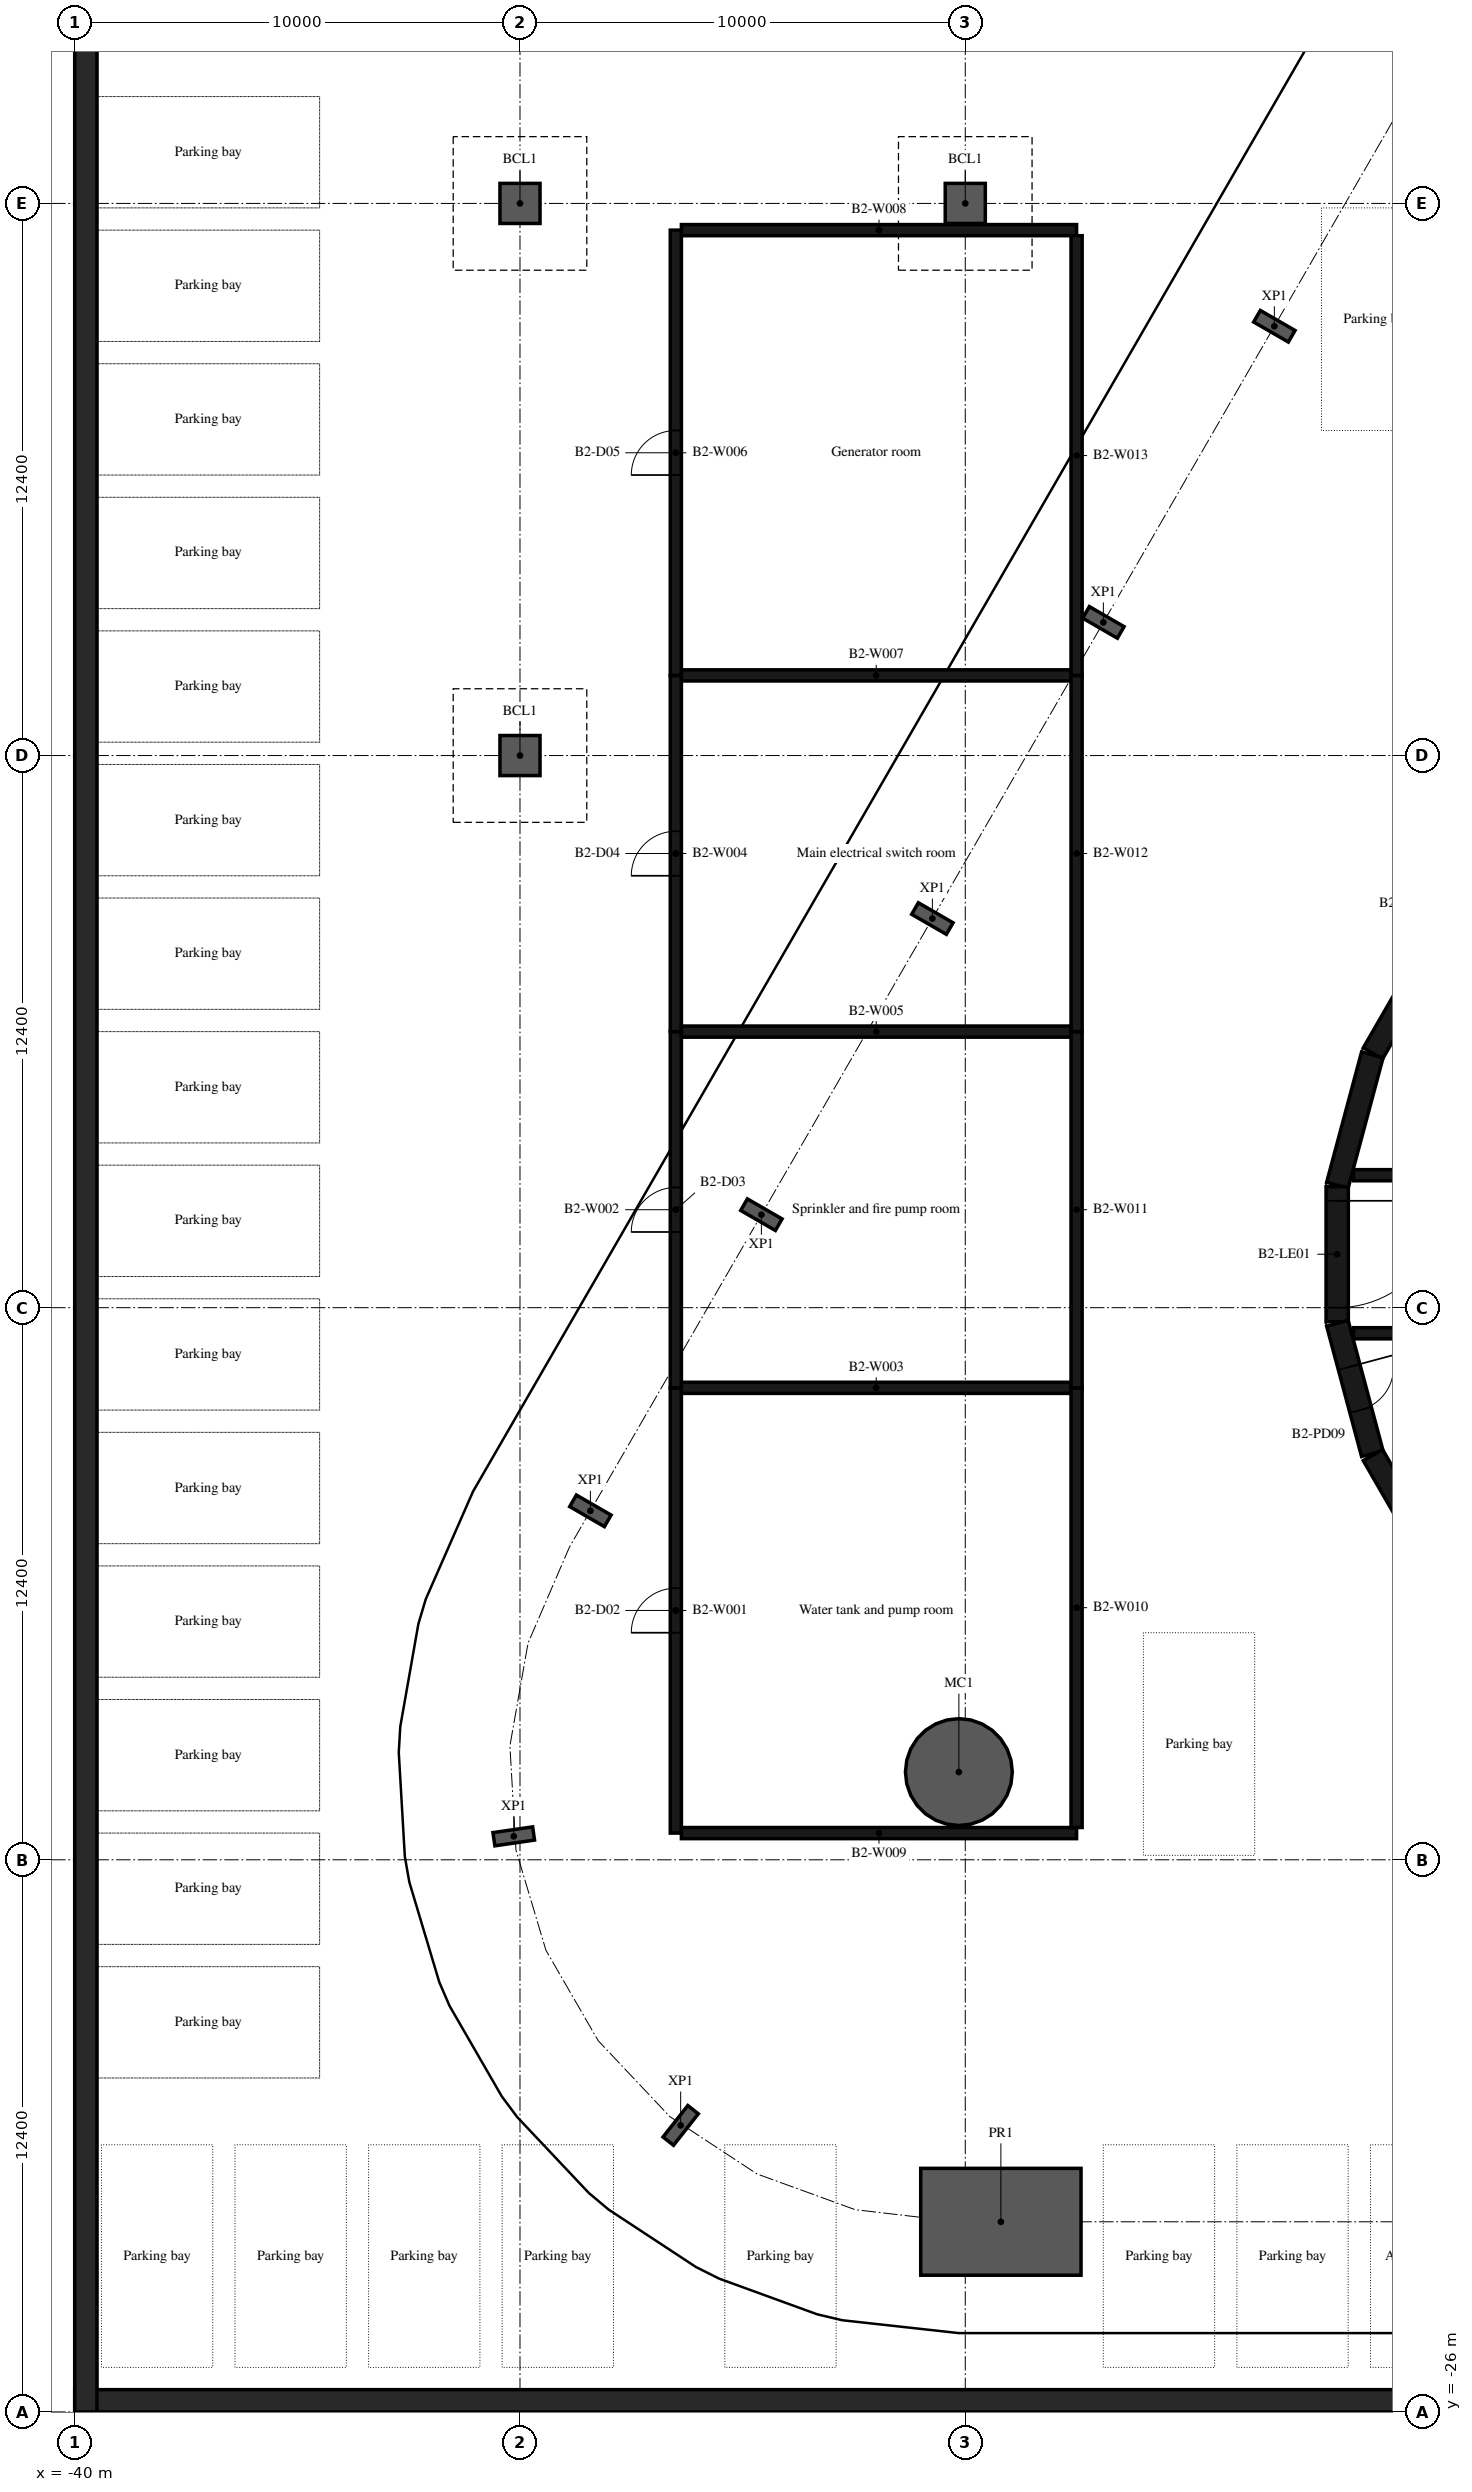
"""IFC4 building model, lengths in metres.
Left out: names, types, materials, properties, quantities, classifications, styles, units other than length and angle.
Written with IfcOpenShell. Run it as: python <this file> out.ifc"""

import sys

from ifc_helpers import new_model, si_unit, direction, frame, frame_2d, origin, origin_2d, place, context, subcontext, project, spatial, rectangle, hollow_circle, i_section, extrude, element, fill, save


model = new_model("IFC4")
c1 = context("Model", 3, precision=1e-05, world=origin(), true_north=direction((0.0, 1.0)))
c2 = subcontext(c1, "Body", "Model", "MODEL_VIEW")
j1 = project(units=[si_unit("LENGTHUNIT", "METRE"), si_unit("PLANEANGLEUNIT", "RADIAN")], contexts=[c1])
p1 = place(None, origin())
s1 = spatial("IfcSite", under=j1, at=p1, CompositionType="ELEMENT")
p2 = place(p1, origin())
s2 = spatial("IfcBuilding", under=s1, at=p2, CompositionType="ELEMENT")
p3 = place(p2, frame((0.0, 0.0, -8.4)))
s3 = spatial("IfcBuildingStorey", under=s2, at=p3, CompositionType="ELEMENT", Elevation=-8.4)
for number, where, z_axis, x_axis in (
    (1, (-30.0, 11.2, 0.0), (0.0, 0.0, 1.0), (1.0, 0.0, 0.0)),
    (2, (-30.0, 23.6, 0.0), (0.0, 0.0, 1.0), (1.0, 0.0, 0.0)),
    (3, (-20.0, 23.6, 0.0), (0.0, 0.0, 1.0), (1.0, 0.0, 0.0)),
):
    element("IfcColumn", number, at=place(p3, frame(where, z_axis=z_axis, x_axis=x_axis)), inside=s3, PredefinedType="COLUMN", context=c2, shape_type="SweptSolid", body=[
        extrude(rectangle(XDim=0.9, YDim=0.9, at=origin_2d()), origin(), (0.0, 0.0, 1.0), 3.82),
    ])
p4 = place(p3, frame((-20.144, -11.63, 0.0), z_axis=(0.0, 0.0, 1.0), x_axis=(1.0, 0.0, 0.0)))
e4 = element("IfcColumn", 4, at=p4, inside=s3, PredefinedType="COLUMN", context=c2, shape_type="SweptSolid", body=[
    extrude(hollow_circle(Radius=1.2, WallThickness=0.06, at=origin_2d()), origin(), (0.0, 0.0, 1.0), 3.82),
])
for number, where, z_axis, x_axis in (
    (5, (-13.059, 20.842, 0.0), (0.0, 0.0, 1.0), (0.5, 0.866, 0.0)),
    (6, (-16.899, 14.19, 0.0), (0.0, 0.0, 1.0), (0.5, 0.866, 0.0)),
    (7, (-20.739, 7.539, 0.0), (0.0, 0.0, 1.0), (0.5, 0.866, 0.0)),
    (8, (-24.579, 0.888, 0.0), (0.0, 0.0, 1.0), (0.5, 0.866, 0.0)),
    (9, (-28.419, -5.763, 0.0), (0.0, 0.0, 1.0), (0.5, 0.866, 0.0)),
    (10, (-30.14, -13.073, 0.0), (0.0, 0.0, 1.0), (-0.143, 0.99, 0.0)),
    (11, (-26.392, -19.565, 0.0), (0.0, 0.0, 1.0), (-0.786, 0.619, 0.0)),
):
    element("IfcColumn", number, at=place(p3, frame(where, z_axis=z_axis, x_axis=x_axis)), inside=s3, PredefinedType="COLUMN", context=c2, shape_type="SweptSolid", body=[
        extrude(i_section(OverallWidth=0.3, OverallDepth=0.9, WebThickness=0.019, FlangeThickness=0.035, FilletRadius=0.03, at=origin_2d()), origin(), (0.0, 0.0, 1.0), 3.82),
    ])
p5 = place(p3, frame((-19.2, -21.73, 0.0), z_axis=(0.0, 0.0, 1.0), x_axis=(1.0, 0.0, 0.0)))
e12 = element("IfcColumn", 12, at=p5, inside=s3, PredefinedType="COLUMN", context=c2, shape_type="SweptSolid", body=[
    extrude(rectangle(XDim=3.6, YDim=2.4, at=origin_2d()), origin(), (0.0, 0.0, 1.0), 3.82),
])
p6 = place(p3, frame((-40.0, -25.75, -0.4), z_axis=(0.0, 0.0, 1.0), x_axis=(1.0, 0.0, 0.0)))
e13 = element("IfcWall", 13, at=p6, inside=s3, PredefinedType="SOLIDWALL", context=c2, shape_type="SweptSolid", body=[
    extrude(rectangle(XDim=80.0, YDim=0.5, at=frame_2d((40.0, 0.0))), origin(), (0.0, 0.0, 1.0), 4.22),
])
p7 = place(p3, frame((-39.75, 36.0, -0.4), z_axis=(0.0, 0.0, 1.0), x_axis=(0.0, -1.0, 0.0)))
e14 = element("IfcWall", 14, at=p7, inside=s3, PredefinedType="SOLIDWALL", context=c2, shape_type="SweptSolid", body=[
    extrude(rectangle(XDim=62.0, YDim=0.5, at=frame_2d((31.0, 0.0))), origin(), (0.0, 0.0, 1.0), 4.22),
])
for number, where, z_axis, x_axis in (
    (15, (-9.329, 7.137, 0.0), (0.0, 0.0, 1.0), (-0.5, -0.866, 0.0)),
    (16, (-10.858, 4.479, 0.0), (0.0, 0.0, 1.0), (-0.259, -0.966, 0.0)),
):
    element("IfcWall", number, at=place(p3, frame(where, z_axis=z_axis, x_axis=x_axis)), inside=s3, PredefinedType="SHEAR", context=c2, shape_type="SweptSolid", body=[
        extrude(rectangle(XDim=3.033, YDim=0.5, at=frame_2d((1.516, 0.0))), origin(), (0.0, 0.0, 1.0), 3.82),
    ])
p8 = place(p3, frame((-11.647, 1.516, 0.0), z_axis=(0.0, 0.0, 1.0), x_axis=(0.0, -1.0, 0.0)))
e17 = element("IfcWall", 17, at=p8, inside=s3, PredefinedType="SHEAR", context=c2, shape_type="SweptSolid", body=[
    extrude(rectangle(XDim=3.033, YDim=0.5, at=frame_2d((1.516, 0.0))), origin(), (0.0, 0.0, 1.0), 3.82),
])
p9 = place(p8, frame((0.316, 0.0, 0.0)))
e18 = element("IfcOpeningElement", 18, at=p9, cuts=e17, PredefinedType="OPENING", context=c2, shape_type="SweptSolid", body=[
    extrude(rectangle(XDim=2.4, YDim=2.1, at=frame_2d((1.2, 1.05))), frame((0.0, 0.26, 0.0), z_axis=(0.0, -1.0, 0.0), x_axis=(1.0, 0.0, 0.0)), (0.0, 0.0, 1.0), 0.52),
])
p10 = place(p3, frame((-11.643, -1.55, 0.0), z_axis=(0.0, 0.0, 1.0), x_axis=(0.258734743916, -0.965948410781, 0.0)))
e19 = element("IfcWall", 19, at=p10, inside=s3, PredefinedType="SHEAR", context=c2, shape_type="SweptSolid", body=[
    extrude(rectangle(XDim=3.033, YDim=0.5, at=frame_2d((1.516, 0.0))), origin(), (0.0, 0.0, 1.0), 3.82),
])
p11 = place(p10, frame((1.016, 0.0, 0.0)))
e20 = element("IfcOpeningElement", 20, at=p11, cuts=e19, PredefinedType="OPENING", context=c2, shape_type="SweptSolid", body=[
    extrude(rectangle(XDim=1.0, YDim=2.4, at=frame_2d((0.5, 1.2))), frame((0.0, 0.26, 0.0), z_axis=(0.0, -1.0, 0.0), x_axis=(1.0, 0.0, 0.0)), (0.0, 0.0, 1.0), 0.52),
])
p12 = place(p3, frame((-10.845, -4.51, 0.0), z_axis=(0.0, 0.0, 1.0), x_axis=(0.500087131594, -0.865975092491, 0.0)))
e21 = element("IfcWall", 21, at=p12, inside=s3, PredefinedType="SHEAR", context=c2, shape_type="SweptSolid", body=[
    extrude(rectangle(XDim=3.033, YDim=0.5, at=frame_2d((1.516, 0.0))), origin(), (0.0, 0.0, 1.0), 3.82),
])
p13 = place(p3, frame((-11.28, 1.775, 0.0), z_axis=(0.0, 0.0, 1.0), x_axis=(1.0, 0.0, 0.0)))
e22 = element("IfcWall", 22, at=p13, inside=s3, PredefinedType="SHEAR", context=c2, shape_type="SweptSolid", body=[
    extrude(rectangle(XDim=14.38, YDim=0.25, at=frame_2d((7.19, 0.0))), origin(), (0.0, 0.0, 1.0), 3.82),
])
p14 = place(p13, frame((10.78, 0.0, 0.0)))
e23 = element("IfcOpeningElement", 23, at=p14, cuts=e22, PredefinedType="OPENING", context=c2, shape_type="SweptSolid", body=[
    extrude(rectangle(XDim=1.0, YDim=2.4, at=frame_2d((0.5, 1.2))), frame((0.0, 0.135, 0.0), z_axis=(0.0, -1.0, 0.0), x_axis=(1.0, 0.0, 0.0)), (0.0, 0.0, 1.0), 0.27),
])
p15 = place(p13, frame((12.93, 0.0, 0.0)))
e24 = element("IfcOpeningElement", 24, at=p15, cuts=e22, PredefinedType="OPENING", context=c2, shape_type="SweptSolid", body=[
    extrude(rectangle(XDim=1.0, YDim=2.4, at=frame_2d((0.5, 1.2))), frame((0.0, 0.135, 0.0), z_axis=(0.0, -1.0, 0.0), x_axis=(1.0, 0.0, 0.0)), (0.0, 0.0, 1.0), 0.27),
])
p16 = place(p3, frame((-11.28, -1.775, 0.0), z_axis=(0.0, 0.0, 1.0), x_axis=(1.0, 0.0, 0.0)))
e25 = element("IfcWall", 25, at=p16, inside=s3, PredefinedType="SHEAR", context=c2, shape_type="SweptSolid", body=[
    extrude(rectangle(XDim=14.38, YDim=0.25, at=frame_2d((7.19, 0.0))), origin(), (0.0, 0.0, 1.0), 3.82),
])
p17 = place(p16, frame((9.705, 0.0, 0.0)))
e26 = element("IfcOpeningElement", 26, at=p17, cuts=e25, PredefinedType="OPENING", context=c2, shape_type="SweptSolid", body=[
    extrude(rectangle(XDim=1.0, YDim=2.4, at=frame_2d((0.5, 1.2))), frame((0.0, 0.135, 0.0), z_axis=(0.0, -1.0, 0.0), x_axis=(1.0, 0.0, 0.0)), (0.0, 0.0, 1.0), 0.27),
])
p18 = place(p3, frame((-26.5, -13.0, 0.0), z_axis=(0.0, 0.0, 1.0), x_axis=(0.0, 1.0, 0.0)))
e27 = element("IfcWall", 27, at=p18, inside=s3, PredefinedType="PARTITIONING", context=c2, shape_type="SweptSolid", body=[
    extrude(rectangle(XDim=10.0, YDim=0.25, at=frame_2d((5.0, 0.0))), origin(), (0.0, 0.0, 1.0), 3.82),
])
p19 = place(p18, frame((4.5, 0.0, 0.0)))
e28 = element("IfcOpeningElement", 28, at=p19, cuts=e27, PredefinedType="OPENING", context=c2, shape_type="SweptSolid", body=[
    extrude(rectangle(XDim=1.0, YDim=2.1, at=frame_2d((0.5, 1.05))), frame((0.0, 0.135, 0.0), z_axis=(0.0, -1.0, 0.0), x_axis=(1.0, 0.0, 0.0)), (0.0, 0.0, 1.0), 0.27),
])
p20 = place(p3, frame((-26.5, -3.0, 0.0), z_axis=(0.0, 0.0, 1.0), x_axis=(0.0, 1.0, 0.0)))
e29 = element("IfcWall", 29, at=p20, inside=s3, PredefinedType="PARTITIONING", context=c2, shape_type="SweptSolid", body=[
    extrude(rectangle(XDim=8.0, YDim=0.25, at=frame_2d((4.0, 0.0))), origin(), (0.0, 0.0, 1.0), 3.82),
])
p21 = place(p20, frame((3.5, 0.0, 0.0)))
e30 = element("IfcOpeningElement", 30, at=p21, cuts=e29, PredefinedType="OPENING", context=c2, shape_type="SweptSolid", body=[
    extrude(rectangle(XDim=1.0, YDim=2.1, at=frame_2d((0.5, 1.05))), frame((0.0, 0.135, 0.0), z_axis=(0.0, -1.0, 0.0), x_axis=(1.0, 0.0, 0.0)), (0.0, 0.0, 1.0), 0.27),
])
p22 = place(p3, frame((-26.375, -3.0, 0.0), z_axis=(0.0, 0.0, 1.0), x_axis=(1.0, 0.0, 0.0)))
e31 = element("IfcWall", 31, at=p22, inside=s3, PredefinedType="PARTITIONING", context=c2, shape_type="SweptSolid", body=[
    extrude(rectangle(XDim=8.75, YDim=0.25, at=frame_2d((4.375, 0.0))), origin(), (0.0, 0.0, 1.0), 3.82),
])
p23 = place(p3, frame((-26.5, 5.0, 0.0), z_axis=(0.0, 0.0, 1.0), x_axis=(0.0, 1.0, 0.0)))
e32 = element("IfcWall", 32, at=p23, inside=s3, PredefinedType="PARTITIONING", context=c2, shape_type="SweptSolid", body=[
    extrude(rectangle(XDim=8.0, YDim=0.25, at=frame_2d((4.0, 0.0))), origin(), (0.0, 0.0, 1.0), 3.82),
])
p24 = place(p23, frame((3.5, 0.0, 0.0)))
e33 = element("IfcOpeningElement", 33, at=p24, cuts=e32, PredefinedType="OPENING", context=c2, shape_type="SweptSolid", body=[
    extrude(rectangle(XDim=1.0, YDim=2.1, at=frame_2d((0.5, 1.05))), frame((0.0, 0.135, 0.0), z_axis=(0.0, -1.0, 0.0), x_axis=(1.0, 0.0, 0.0)), (0.0, 0.0, 1.0), 0.27),
])
p25 = place(p3, frame((-26.375, 5.0, 0.0), z_axis=(0.0, 0.0, 1.0), x_axis=(1.0, 0.0, 0.0)))
e34 = element("IfcWall", 34, at=p25, inside=s3, PredefinedType="PARTITIONING", context=c2, shape_type="SweptSolid", body=[
    extrude(rectangle(XDim=8.75, YDim=0.25, at=frame_2d((4.375, 0.0))), origin(), (0.0, 0.0, 1.0), 3.82),
])
p26 = place(p3, frame((-26.5, 13.0, 0.0), z_axis=(0.0, 0.0, 1.0), x_axis=(0.0, 1.0, 0.0)))
e35 = element("IfcWall", 35, at=p26, inside=s3, PredefinedType="PARTITIONING", context=c2, shape_type="SweptSolid", body=[
    extrude(rectangle(XDim=10.0, YDim=0.25, at=frame_2d((5.0, 0.0))), origin(), (0.0, 0.0, 1.0), 3.82),
])
p27 = place(p26, frame((4.5, 0.0, 0.0)))
e36 = element("IfcOpeningElement", 36, at=p27, cuts=e35, PredefinedType="OPENING", context=c2, shape_type="SweptSolid", body=[
    extrude(rectangle(XDim=1.0, YDim=2.1, at=frame_2d((0.5, 1.05))), frame((0.0, 0.135, 0.0), z_axis=(0.0, -1.0, 0.0), x_axis=(1.0, 0.0, 0.0)), (0.0, 0.0, 1.0), 0.27),
])
p28 = place(p3, frame((-26.375, 13.0, 0.0), z_axis=(0.0, 0.0, 1.0), x_axis=(1.0, 0.0, 0.0)))
e37 = element("IfcWall", 37, at=p28, inside=s3, PredefinedType="PARTITIONING", context=c2, shape_type="SweptSolid", body=[
    extrude(rectangle(XDim=8.75, YDim=0.25, at=frame_2d((4.375, 0.0))), origin(), (0.0, 0.0, 1.0), 3.82),
])
for number, where, z_axis, x_axis in (
    (38, (-26.375, 23.0, 0.0), (0.0, 0.0, 1.0), (1.0, 0.0, 0.0)),
    (39, (-17.5, -13.0, 0.0), (0.0, 0.0, 1.0), (-1.0, 0.0, 0.0)),
):
    element("IfcWall", number, at=place(p3, frame(where, z_axis=z_axis, x_axis=x_axis)), inside=s3, PredefinedType="PARTITIONING", context=c2, shape_type="SweptSolid", body=[
        extrude(rectangle(XDim=8.875, YDim=0.25, at=frame_2d((4.438, 0.0))), origin(), (0.0, 0.0, 1.0), 3.82),
    ])
p29 = place(p3, frame((-17.5, -3.0, 0.0), z_axis=(0.0, 0.0, 1.0), x_axis=(0.0, -1.0, 0.0)))
e40 = element("IfcWall", 40, at=p29, inside=s3, PredefinedType="PARTITIONING", context=c2, shape_type="SweptSolid", body=[
    extrude(rectangle(XDim=9.875, YDim=0.25, at=frame_2d((4.938, 0.0))), origin(), (0.0, 0.0, 1.0), 3.82),
])
for number, where, z_axis, x_axis in (
    (41, (-17.5, 5.0, 0.0), (0.0, 0.0, 1.0), (0.0, -1.0, 0.0)),
    (42, (-17.5, 13.0, 0.0), (0.0, 0.0, 1.0), (0.0, -1.0, 0.0)),
):
    element("IfcWall", number, at=place(p3, frame(where, z_axis=z_axis, x_axis=x_axis)), inside=s3, PredefinedType="PARTITIONING", context=c2, shape_type="SweptSolid", body=[
        extrude(rectangle(XDim=8.0, YDim=0.25, at=frame_2d((4.0, 0.0))), origin(), (0.0, 0.0, 1.0), 3.82),
    ])
p30 = place(p3, frame((-17.5, 22.875, 0.0), z_axis=(0.0, 0.0, 1.0), x_axis=(0.0, -1.0, 0.0)))
e43 = element("IfcWall", 43, at=p30, inside=s3, PredefinedType="PARTITIONING", context=c2, shape_type="SweptSolid", body=[
    extrude(rectangle(XDim=9.875, YDim=0.25, at=frame_2d((4.938, 0.0))), origin(), (0.0, 0.0, 1.0), 3.82),
])
p31 = place(p9, origin())
e44 = element("IfcDoor", 44, at=p31, inside=s3, OperationType="DOUBLE_DOOR_SINGLE_SWING", PredefinedType="DOOR", context=c2, shape_type="SweptSolid", body=[
    extrude(rectangle(XDim=2.4, YDim=2.1, at=frame_2d((1.2, 1.05))), frame((0.0, 0.025, 0.0), z_axis=(0.0, -1.0, 0.0), x_axis=(1.0, 0.0, 0.0)), (0.0, 0.0, 1.0), 0.05),
])
fill(e18, e44)
p32 = place(p11, origin())
e45 = element("IfcDoor", 45, at=p32, inside=s3, OperationType="SINGLE_SWING_RIGHT", PredefinedType="DOOR", context=c2, shape_type="SweptSolid", body=[
    extrude(rectangle(XDim=1.0, YDim=2.4, at=frame_2d((0.5, 1.2))), frame((0.0, 0.025, 0.0), z_axis=(0.0, -1.0, 0.0), x_axis=(1.0, 0.0, 0.0)), (0.0, 0.0, 1.0), 0.05),
])
fill(e20, e45)
p33 = place(p19, origin())
e46 = element("IfcDoor", 46, at=p33, inside=s3, OperationType="SINGLE_SWING_LEFT", PredefinedType="DOOR", context=c2, shape_type="SweptSolid", body=[
    extrude(rectangle(XDim=1.0, YDim=2.1, at=frame_2d((0.5, 1.05))), frame((0.0, 0.025, 0.0), z_axis=(0.0, -1.0, 0.0), x_axis=(1.0, 0.0, 0.0)), (0.0, 0.0, 1.0), 0.05),
])
fill(e28, e46)
p34 = place(p21, origin())
e47 = element("IfcDoor", 47, at=p34, inside=s3, OperationType="SINGLE_SWING_LEFT", PredefinedType="DOOR", context=c2, shape_type="SweptSolid", body=[
    extrude(rectangle(XDim=1.0, YDim=2.1, at=frame_2d((0.5, 1.05))), frame((0.0, 0.025, 0.0), z_axis=(0.0, -1.0, 0.0), x_axis=(1.0, 0.0, 0.0)), (0.0, 0.0, 1.0), 0.05),
])
fill(e30, e47)
p35 = place(p24, origin())
e48 = element("IfcDoor", 48, at=p35, inside=s3, OperationType="SINGLE_SWING_LEFT", PredefinedType="DOOR", context=c2, shape_type="SweptSolid", body=[
    extrude(rectangle(XDim=1.0, YDim=2.1, at=frame_2d((0.5, 1.05))), frame((0.0, 0.025, 0.0), z_axis=(0.0, -1.0, 0.0), x_axis=(1.0, 0.0, 0.0)), (0.0, 0.0, 1.0), 0.05),
])
fill(e33, e48)
p36 = place(p27, origin())
e49 = element("IfcDoor", 49, at=p36, inside=s3, OperationType="SINGLE_SWING_LEFT", PredefinedType="DOOR", context=c2, shape_type="SweptSolid", body=[
    extrude(rectangle(XDim=1.0, YDim=2.1, at=frame_2d((0.5, 1.05))), frame((0.0, 0.025, 0.0), z_axis=(0.0, -1.0, 0.0), x_axis=(1.0, 0.0, 0.0)), (0.0, 0.0, 1.0), 0.05),
])
fill(e36, e49)
save(model, sys.argv[1])
